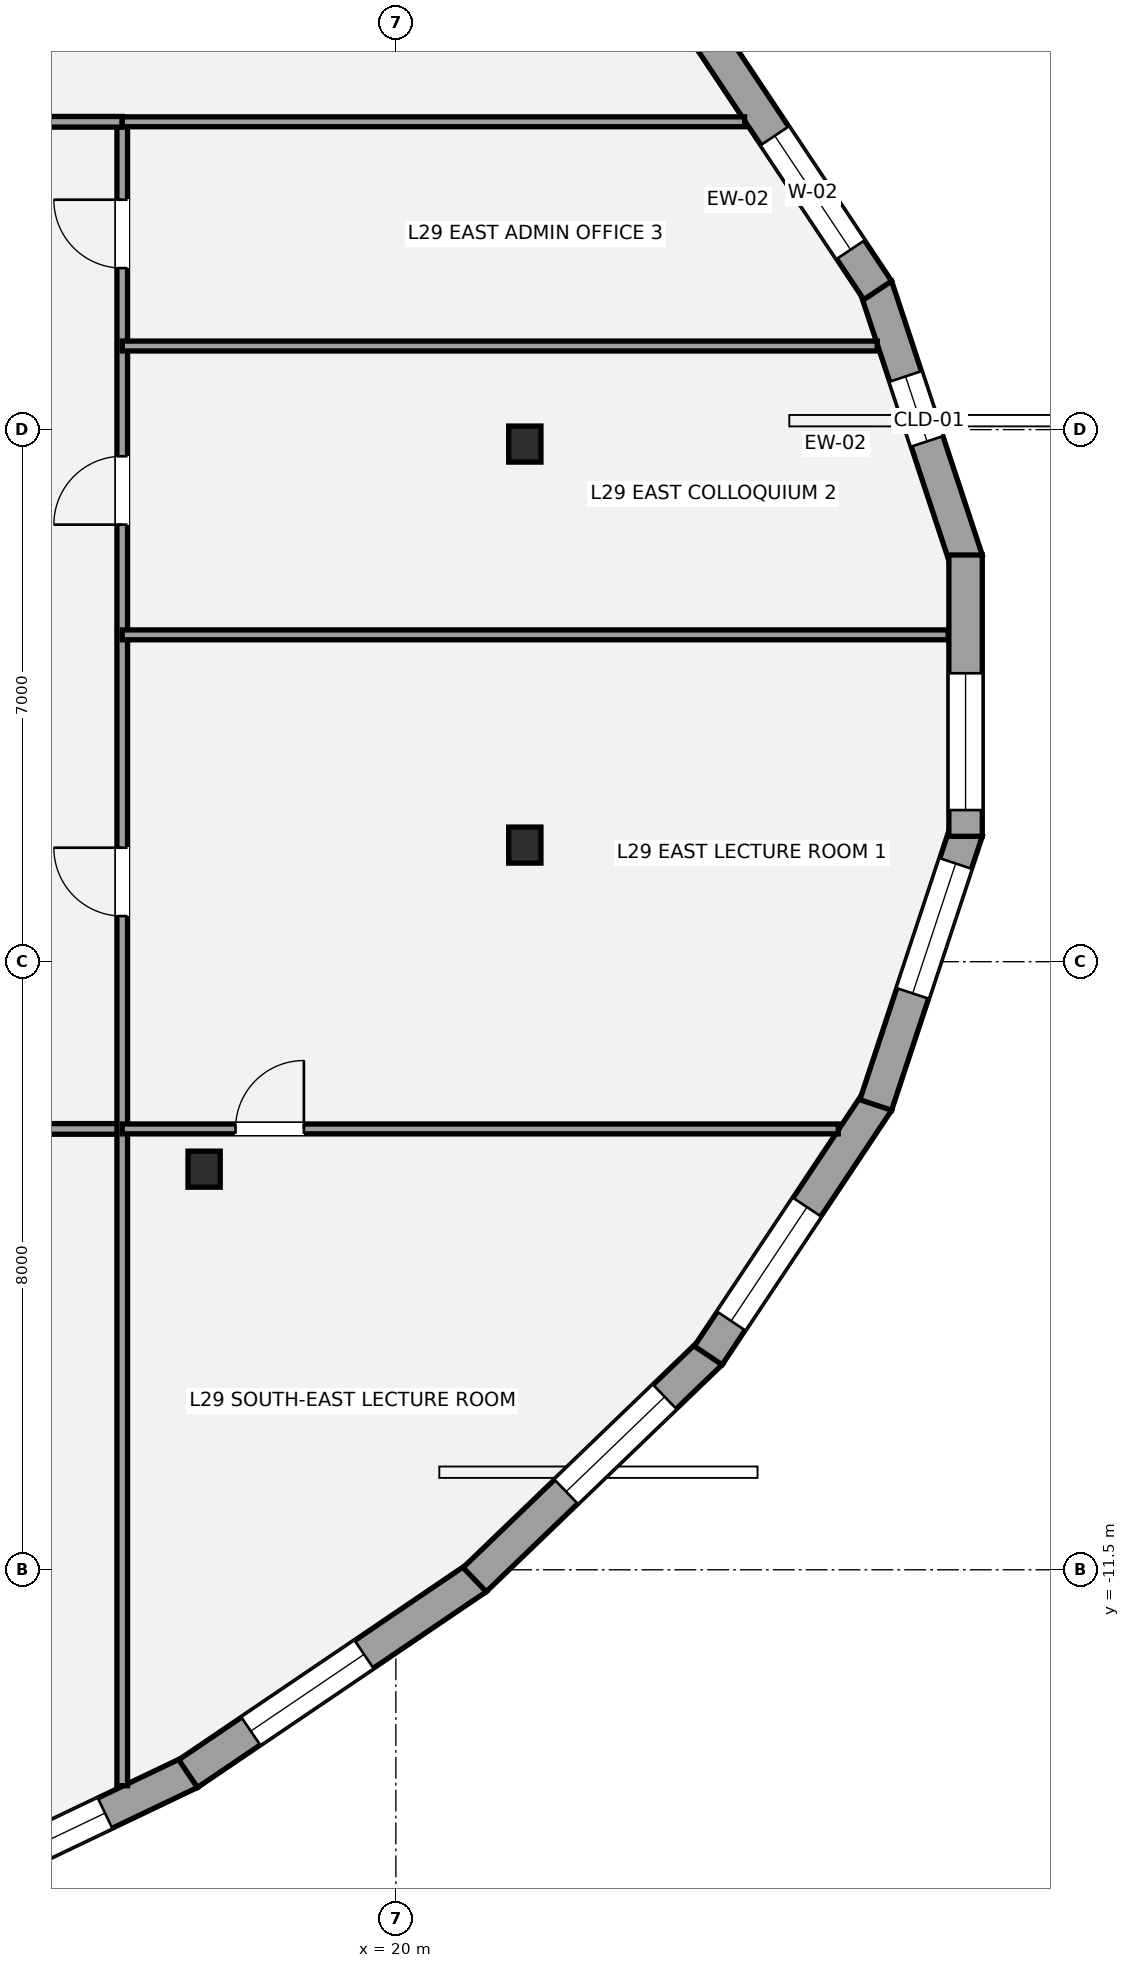
"""IFC4 building model, lengths in metres.
Left out: names, types, materials, properties, quantities, classifications, styles, units other than length and angle.
Written with IfcOpenShell. Run it as: python <this file> out.ifc"""

import sys

from ifc_helpers import new_model, si_unit, direction, frame, frame_2d, origin, origin_2d, place, context, subcontext, project, spatial, rectangle, i_section, extrude, element, fill, save


model = new_model("IFC4")
c1 = context("Model", 3, precision=1e-05, world=origin(), true_north=direction((0.0, 1.0)))
c2 = subcontext(c1, "Body", "Model", "MODEL_VIEW")
j1 = project(units=[si_unit("LENGTHUNIT", "METRE"), si_unit("PLANEANGLEUNIT", "RADIAN")], contexts=[c1])
p1 = place(None, origin())
s1 = spatial("IfcSite", under=j1, at=p1, CompositionType="ELEMENT")
p2 = place(p1, origin())
s2 = spatial("IfcBuilding", under=s1, at=p2, CompositionType="ELEMENT")
p3 = place(p2, frame((0.0, 0.0, 110.6)))
s3 = spatial("IfcBuildingStorey", under=s2, at=p3, CompositionType="ELEMENT", Elevation=110.6)
for number, where, z_axis, x_axis in (
    (1, (21.697, 3.31, 0.0), (0.0, 0.0, 1.0), (1.0, 0.0, 0.0)),
    (2, (17.477, -6.229, 0.0), (0.0, 0.0, 1.0), (1.0, 0.0, 0.0)),
    (3, (21.697, -1.966, 0.0), (0.0, 0.0, 1.0), (1.0, 0.0, 0.0)),
):
    element("IfcColumn", number, at=place(p3, frame(where, z_axis=z_axis, x_axis=x_axis)), inside=s3, PredefinedType="COLUMN", context=c2, shape_type="SweptSolid", body=[
        extrude(i_section(OverallWidth=0.424, OverallDepth=0.474, WebThickness=0.048, FlangeThickness=0.077, at=origin_2d()), origin(), (0.0, 0.0, 1.0), 3.5),
    ])
p4 = place(p3, frame((26.314, 5.385, 0.0), z_axis=(0.0, 0.0, 1.0), x_axis=(0.314316911692, -0.94931811266, 0.0)))
e4 = element("IfcWall", 4, at=p4, inside=s3, PredefinedType="STANDARD", context=c2, shape_type="SweptSolid", body=[
    extrude(rectangle(XDim=3.796, YDim=0.44, at=frame_2d((1.898, 0.0))), origin(), (0.0, 0.0, 1.0), 2.532),
])
p5 = place(p4, frame((1.248, 0.0, 0.58)))
e5 = element("IfcOpeningElement", 5, at=p5, cuts=e4, PredefinedType="OPENING", context=c2, shape_type="SweptSolid", body=[
    extrude(rectangle(XDim=0.9, YDim=1.35, at=frame_2d((0.45, 0.675))), frame((0.0, 0.23, 0.0), z_axis=(0.0, -1.0, 0.0), x_axis=(1.0, 0.0, 0.0)), (0.0, 0.0, 1.0), 0.46),
])
p6 = place(p3, frame((24.11, 8.68, 0.0), z_axis=(0.0, 0.0, 1.0), x_axis=(0.554293965046, -0.83232097193, 0.0)))
e6 = element("IfcWall", 6, at=p6, inside=s3, PredefinedType="STANDARD", context=c2, shape_type="SweptSolid", body=[
    extrude(rectangle(XDim=4.023, YDim=0.44, at=frame_2d((2.011, 0.0))), origin(), (0.0, 0.0, 1.0), 2.528),
])
p7 = place(p6, frame((1.579, 0.0, 0.65)))
e7 = element("IfcOpeningElement", 7, at=p7, cuts=e6, PredefinedType="OPENING", context=c2, shape_type="SweptSolid", body=[
    extrude(rectangle(XDim=1.8, YDim=1.7, at=frame_2d((0.9, 0.85))), frame((0.0, 0.23, 0.0), z_axis=(0.0, -1.0, 0.0), x_axis=(1.0, 0.0, 0.0)), (0.0, 0.0, 1.0), 0.46),
])
p8 = place(p3, frame((17.295, -14.166, 0.0), z_axis=(0.0, 0.0, 1.0), x_axis=(-0.902372757907, -0.430956385018, 0.0)))
e8 = element("IfcWall", 8, at=p8, inside=s3, PredefinedType="STANDARD", context=c2, shape_type="SweptSolid", body=[
    extrude(rectangle(XDim=4.882, YDim=0.44, at=frame_2d((2.441, 0.0))), origin(), (0.0, 0.0, 1.0), 2.528),
])
p9 = place(p8, frame((1.243, 0.0, 0.65)))
e9 = element("IfcOpeningElement", 9, at=p9, cuts=e8, PredefinedType="OPENING", context=c2, shape_type="SweptSolid", body=[
    extrude(rectangle(XDim=1.8, YDim=1.7, at=frame_2d((0.9, 0.85))), frame((0.0, 0.23, 0.0), z_axis=(0.0, -1.0, 0.0), x_axis=(1.0, 0.0, 0.0)), (0.0, 0.0, 1.0), 0.46),
])
p10 = place(p3, frame((21.066, -11.606, 0.0), z_axis=(0.0, 0.0, 1.0), x_axis=(-0.827754551165, -0.56109036975, 0.0)))
e10 = element("IfcWall", 10, at=p10, inside=s3, PredefinedType="STANDARD", context=c2, shape_type="SweptSolid", body=[
    extrude(rectangle(XDim=4.591, YDim=0.44, at=frame_2d((2.295, 0.0))), origin(), (0.0, 0.0, 1.0), 2.528),
])
p11 = place(p10, frame((1.794, 0.0, 0.65)))
e11 = element("IfcOpeningElement", 11, at=p11, cuts=e10, PredefinedType="OPENING", context=c2, shape_type="SweptSolid", body=[
    extrude(rectangle(XDim=1.8, YDim=1.7, at=frame_2d((0.9, 0.85))), frame((0.0, 0.23, 0.0), z_axis=(0.0, -1.0, 0.0), x_axis=(1.0, 0.0, 0.0)), (0.0, 0.0, 1.0), 0.46),
])
p12 = place(p3, frame((24.14, -8.644, 0.0), z_axis=(0.0, 0.0, 1.0), x_axis=(-0.720581378362, -0.693370375166, 0.0)))
e12 = element("IfcWall", 12, at=p12, inside=s3, PredefinedType="STANDARD", context=c2, shape_type="SweptSolid", body=[
    extrude(rectangle(XDim=4.307, YDim=0.44, at=frame_2d((2.153, 0.0))), origin(), (0.0, 0.0, 1.0), 2.528),
])
p13 = place(p12, frame((0.837, 0.0, 0.65)))
e13 = element("IfcOpeningElement", 13, at=p13, cuts=e12, PredefinedType="OPENING", context=c2, shape_type="SweptSolid", body=[
    extrude(rectangle(XDim=1.8, YDim=1.7, at=frame_2d((0.9, 0.85))), frame((0.0, 0.23, 0.0), z_axis=(0.0, -1.0, 0.0), x_axis=(1.0, 0.0, 0.0)), (0.0, 0.0, 1.0), 0.46),
])
p14 = place(p3, frame((26.34, -5.332, 0.0), z_axis=(0.0, 0.0, 1.0), x_axis=(-0.554293965046, -0.83232097193, 0.0)))
e14 = element("IfcWall", 14, at=p14, inside=s3, PredefinedType="STANDARD", context=c2, shape_type="SweptSolid", body=[
    extrude(rectangle(XDim=4.023, YDim=0.44, at=frame_2d((2.011, 0.0))), origin(), (0.0, 0.0, 1.0), 2.528),
])
p15 = place(p14, frame((1.678, 0.0, 0.65)))
e15 = element("IfcOpeningElement", 15, at=p15, cuts=e14, PredefinedType="OPENING", context=c2, shape_type="SweptSolid", body=[
    extrude(rectangle(XDim=1.8, YDim=1.7, at=frame_2d((0.9, 0.85))), frame((0.0, 0.23, 0.0), z_axis=(0.0, -1.0, 0.0), x_axis=(1.0, 0.0, 0.0)), (0.0, 0.0, 1.0), 0.46),
])
p16 = place(p3, frame((27.507, -1.781, 0.0), z_axis=(0.0, 0.0, 1.0), x_axis=(-0.314316911692, -0.94931811266, 0.0)))
e16 = element("IfcWall", 16, at=p16, inside=s3, PredefinedType="STANDARD", context=c2, shape_type="SweptSolid", body=[
    extrude(rectangle(XDim=3.796, YDim=0.44, at=frame_2d((1.898, 0.0))), origin(), (0.0, 0.0, 1.0), 2.532),
])
p17 = place(p16, frame((0.449, 0.0, 0.65)))
e17 = element("IfcOpeningElement", 17, at=p17, cuts=e16, PredefinedType="OPENING", context=c2, shape_type="SweptSolid", body=[
    extrude(rectangle(XDim=1.8, YDim=1.7, at=frame_2d((0.9, 0.85))), frame((0.0, 0.23, 0.0), z_axis=(0.0, -1.0, 0.0), x_axis=(1.0, 0.0, 0.0)), (0.0, 0.0, 1.0), 0.46),
])
p18 = place(p3, frame((27.496, 1.851, 0.0), z_axis=(0.0, 0.0, 1.0), x_axis=(0.0, -1.0, 0.0)))
e18 = element("IfcWall", 18, at=p18, inside=s3, PredefinedType="STANDARD", context=c2, shape_type="SweptSolid", body=[
    extrude(rectangle(XDim=3.701, YDim=0.44, at=frame_2d((1.851, 0.0))), origin(), (0.0, 0.0, 1.0), 2.532),
])
p19 = place(p18, frame((1.556, 0.0, 0.65)))
e19 = element("IfcOpeningElement", 19, at=p19, cuts=e18, PredefinedType="OPENING", context=c2, shape_type="SweptSolid", body=[
    extrude(rectangle(XDim=1.8, YDim=1.7, at=frame_2d((0.9, 0.85))), frame((0.0, 0.23, 0.0), z_axis=(0.0, -1.0, 0.0), x_axis=(1.0, 0.0, 0.0)), (0.0, 0.0, 1.0), 0.46),
])
p20 = place(p3, frame((-17.8, -5.7, 0.0), z_axis=(0.0, 0.0, 1.0), x_axis=(1.0, 0.0, 0.0)))
e20 = element("IfcWall", 20, at=p20, inside=s3, PredefinedType="PARTITIONING", context=c2, shape_type="SweptSolid", body=[
    extrude(rectangle(XDim=34.2, YDim=0.14, at=frame_2d((17.1, 0.0))), origin(), (0.0, 0.0, 1.0), 2.688),
])
p21 = place(p20, frame((3.4, 0.0, 0.0)))
e21 = element("IfcOpeningElement", 21, at=p21, cuts=e20, PredefinedType="OPENING", context=c2, shape_type="SweptSolid", body=[
    extrude(rectangle(XDim=1.5, YDim=2.15, at=frame_2d((0.75, 1.075))), frame((0.0, 0.08, 0.0), z_axis=(0.0, -1.0, 0.0), x_axis=(1.0, 0.0, 0.0)), (0.0, 0.0, 1.0), 0.16),
])
p22 = place(p20, frame((11.55, 0.0, 0.0)))
e22 = element("IfcOpeningElement", 22, at=p22, cuts=e20, PredefinedType="OPENING", context=c2, shape_type="SweptSolid", body=[
    extrude(rectangle(XDim=1.5, YDim=2.15, at=frame_2d((0.75, 1.075))), frame((0.0, 0.08, 0.0), z_axis=(0.0, -1.0, 0.0), x_axis=(1.0, 0.0, 0.0)), (0.0, 0.0, 1.0), 0.16),
])
p23 = place(p20, frame((19.55, 0.0, 0.0)))
e23 = element("IfcOpeningElement", 23, at=p23, cuts=e20, PredefinedType="OPENING", context=c2, shape_type="SweptSolid", body=[
    extrude(rectangle(XDim=1.5, YDim=2.15, at=frame_2d((0.75, 1.075))), frame((0.0, 0.08, 0.0), z_axis=(0.0, -1.0, 0.0), x_axis=(1.0, 0.0, 0.0)), (0.0, 0.0, 1.0), 0.16),
])
p24 = place(p20, frame((28.5, 0.0, 0.0)))
e24 = element("IfcOpeningElement", 24, at=p24, cuts=e20, PredefinedType="OPENING", context=c2, shape_type="SweptSolid", body=[
    extrude(rectangle(XDim=1.5, YDim=2.15, at=frame_2d((0.75, 1.075))), frame((0.0, 0.08, 0.0), z_axis=(0.0, -1.0, 0.0), x_axis=(1.0, 0.0, 0.0)), (0.0, 0.0, 1.0), 0.16),
])
p25 = place(p3, frame((16.4, -14.341, 0.0), z_axis=(0.0, 0.0, 1.0), x_axis=(0.0, 1.0, 0.0)))
e25 = element("IfcWall", 25, at=p25, inside=s3, PredefinedType="PARTITIONING", context=c2, shape_type="SweptSolid", body=[
    extrude(rectangle(XDim=21.891, YDim=0.14, at=frame_2d((10.945, 0.0))), origin(), (0.0, 0.0, 1.0), 2.763),
])
p26 = place(p25, frame((11.44, 0.0, 0.0)))
e26 = element("IfcOpeningElement", 26, at=p26, cuts=e25, PredefinedType="OPENING", context=c2, shape_type="SweptSolid", body=[
    extrude(rectangle(XDim=0.9, YDim=2.1, at=frame_2d((0.45, 1.05))), frame((0.0, 0.08, 0.0), z_axis=(0.0, -1.0, 0.0), x_axis=(1.0, 0.0, 0.0)), (0.0, 0.0, 1.0), 0.16),
])
p27 = place(p25, frame((16.59, 0.0, 0.0)))
e27 = element("IfcOpeningElement", 27, at=p27, cuts=e25, PredefinedType="OPENING", context=c2, shape_type="SweptSolid", body=[
    extrude(rectangle(XDim=0.9, YDim=2.1, at=frame_2d((0.45, 1.05))), frame((0.0, 0.08, 0.0), z_axis=(0.0, -1.0, 0.0), x_axis=(1.0, 0.0, 0.0)), (0.0, 0.0, 1.0), 0.16),
])
p28 = place(p25, frame((19.965, 0.0, 0.0)))
e28 = element("IfcOpeningElement", 28, at=p28, cuts=e25, PredefinedType="OPENING", context=c2, shape_type="SweptSolid", body=[
    extrude(rectangle(XDim=0.9, YDim=2.1, at=frame_2d((0.45, 1.05))), frame((0.0, 0.08, 0.0), z_axis=(0.0, -1.0, 0.0), x_axis=(1.0, 0.0, 0.0)), (0.0, 0.0, 1.0), 0.16),
])
p29 = place(p3, frame((13.9, 7.55, 0.0), z_axis=(0.0, 0.0, 1.0), x_axis=(1.0, 0.0, 0.0)))
e29 = element("IfcWall", 29, at=p29, inside=s3, PredefinedType="PARTITIONING", context=c2, shape_type="SweptSolid", body=[
    extrude(rectangle(XDim=2.5, YDim=0.14, at=frame_2d((1.25, 0.0))), origin(), (0.0, 0.0, 1.0), 2.763),
])
p30 = place(p29, frame((0.32, 0.0, 0.0)))
e30 = element("IfcOpeningElement", 30, at=p30, cuts=e29, PredefinedType="OPENING", context=c2, shape_type="SweptSolid", body=[
    extrude(rectangle(XDim=0.92, YDim=2.15, at=frame_2d((0.46, 1.075))), frame((0.0, 0.08, 0.0), z_axis=(0.0, -1.0, 0.0), x_axis=(1.0, 0.0, 0.0)), (0.0, 0.0, 1.0), 0.16),
])
p31 = place(p3, frame((16.4, 7.55, 0.0), z_axis=(0.0, 0.0, 1.0), x_axis=(1.0, 0.0, 0.0)))
e31 = element("IfcWall", 31, at=p31, inside=s3, PredefinedType="PARTITIONING", context=c2, shape_type="SweptSolid", body=[
    extrude(rectangle(XDim=8.189, YDim=0.13, at=frame_2d((4.094, 0.0))), origin(), (0.0, 0.0, 1.0), 2.763),
])
p32 = place(p3, frame((16.4, -5.7, 0.0), z_axis=(0.0, 0.0, 1.0), x_axis=(1.0, 0.0, 0.0)))
e32 = element("IfcWall", 32, at=p32, inside=s3, PredefinedType="PARTITIONING", context=c2, shape_type="SweptSolid", body=[
    extrude(rectangle(XDim=9.421, YDim=0.13, at=frame_2d((4.71, 0.0))), origin(), (0.0, 0.0, 1.0), 2.688),
])
p33 = place(p32, frame((1.49, 0.0, 0.0)))
e33 = element("IfcOpeningElement", 33, at=p33, cuts=e32, PredefinedType="OPENING", context=c2, shape_type="SweptSolid", body=[
    extrude(rectangle(XDim=0.9, YDim=2.1, at=frame_2d((0.45, 1.05))), frame((0.0, 0.075, 0.0), z_axis=(0.0, -1.0, 0.0), x_axis=(1.0, 0.0, 0.0)), (0.0, 0.0, 1.0), 0.15),
])
p34 = place(p3, frame((16.4, 0.8, 0.0), z_axis=(0.0, 0.0, 1.0), x_axis=(1.0, 0.0, 0.0)))
e34 = element("IfcWall", 34, at=p34, inside=s3, PredefinedType="PARTITIONING", context=c2, shape_type="SweptSolid", body=[
    extrude(rectangle(XDim=10.868, YDim=0.13, at=frame_2d((5.434, 0.0))), origin(), (0.0, 0.0, 1.0), 2.763),
])
p35 = place(p3, frame((16.4, 4.6, 0.0), z_axis=(0.0, 0.0, 1.0), x_axis=(1.0, 0.0, 0.0)))
e35 = element("IfcWall", 35, at=p35, inside=s3, PredefinedType="PARTITIONING", context=c2, shape_type="SweptSolid", body=[
    extrude(rectangle(XDim=9.934, YDim=0.13, at=frame_2d((4.967, 0.0))), origin(), (0.0, 0.0, 1.0), 2.763),
])
p36 = place(p5, origin())
e36 = element("IfcWindow", 36, at=p36, inside=s3, PartitioningType="SINGLE_PANEL", PredefinedType="WINDOW", context=c2, shape_type="SweptSolid", body=[
    extrude(rectangle(XDim=0.9, YDim=1.35, at=frame_2d((0.45, 0.675))), frame((0.0, -0.01, 0.0), z_axis=(0.0, -1.0, 0.0), x_axis=(1.0, 0.0, 0.0)), (0.0, 0.0, 1.0), 0.06),
])
fill(e5, e36)
p37 = place(p7, origin())
e37 = element("IfcWindow", 37, at=p37, inside=s3, PartitioningType="SINGLE_PANEL", PredefinedType="WINDOW", context=c2, shape_type="SweptSolid", body=[
    extrude(rectangle(XDim=1.8, YDim=1.7, at=frame_2d((0.9, 0.85))), frame((0.0, -0.01, 0.0), z_axis=(0.0, -1.0, 0.0), x_axis=(1.0, 0.0, 0.0)), (0.0, 0.0, 1.0), 0.06),
])
fill(e7, e37)
p38 = place(p9, origin())
e38 = element("IfcWindow", 38, at=p38, inside=s3, PartitioningType="SINGLE_PANEL", PredefinedType="WINDOW", context=c2, shape_type="SweptSolid", body=[
    extrude(rectangle(XDim=1.8, YDim=1.7, at=frame_2d((0.9, 0.85))), frame((0.0, -0.01, 0.0), z_axis=(0.0, -1.0, 0.0), x_axis=(1.0, 0.0, 0.0)), (0.0, 0.0, 1.0), 0.06),
])
fill(e9, e38)
p39 = place(p11, origin())
e39 = element("IfcWindow", 39, at=p39, inside=s3, PartitioningType="SINGLE_PANEL", PredefinedType="WINDOW", context=c2, shape_type="SweptSolid", body=[
    extrude(rectangle(XDim=1.8, YDim=1.7, at=frame_2d((0.9, 0.85))), frame((0.0, -0.01, 0.0), z_axis=(0.0, -1.0, 0.0), x_axis=(1.0, 0.0, 0.0)), (0.0, 0.0, 1.0), 0.06),
])
fill(e11, e39)
p40 = place(p13, origin())
e40 = element("IfcWindow", 40, at=p40, inside=s3, PartitioningType="SINGLE_PANEL", PredefinedType="WINDOW", context=c2, shape_type="SweptSolid", body=[
    extrude(rectangle(XDim=1.8, YDim=1.7, at=frame_2d((0.9, 0.85))), frame((0.0, -0.01, 0.0), z_axis=(0.0, -1.0, 0.0), x_axis=(1.0, 0.0, 0.0)), (0.0, 0.0, 1.0), 0.06),
])
fill(e13, e40)
p41 = place(p15, origin())
e41 = element("IfcWindow", 41, at=p41, inside=s3, PartitioningType="SINGLE_PANEL", PredefinedType="WINDOW", context=c2, shape_type="SweptSolid", body=[
    extrude(rectangle(XDim=1.8, YDim=1.7, at=frame_2d((0.9, 0.85))), frame((0.0, -0.01, 0.0), z_axis=(0.0, -1.0, 0.0), x_axis=(1.0, 0.0, 0.0)), (0.0, 0.0, 1.0), 0.06),
])
fill(e15, e41)
p42 = place(p17, origin())
e42 = element("IfcWindow", 42, at=p42, inside=s3, PartitioningType="SINGLE_PANEL", PredefinedType="WINDOW", context=c2, shape_type="SweptSolid", body=[
    extrude(rectangle(XDim=1.8, YDim=1.7, at=frame_2d((0.9, 0.85))), frame((0.0, -0.01, 0.0), z_axis=(0.0, -1.0, 0.0), x_axis=(1.0, 0.0, 0.0)), (0.0, 0.0, 1.0), 0.06),
])
fill(e17, e42)
p43 = place(p19, origin())
e43 = element("IfcWindow", 43, at=p43, inside=s3, PartitioningType="SINGLE_PANEL", PredefinedType="WINDOW", context=c2, shape_type="SweptSolid", body=[
    extrude(rectangle(XDim=1.8, YDim=1.7, at=frame_2d((0.9, 0.85))), frame((0.0, -0.01, 0.0), z_axis=(0.0, -1.0, 0.0), x_axis=(1.0, 0.0, 0.0)), (0.0, 0.0, 1.0), 0.06),
])
fill(e19, e43)
p44 = place(p33, origin())
e44 = element("IfcDoor", 44, at=p44, inside=s3, OperationType="SINGLE_SWING_RIGHT", PredefinedType="DOOR", context=c2, shape_type="SweptSolid", body=[
    extrude(rectangle(XDim=0.9, YDim=2.1, at=frame_2d((0.45, 1.05))), frame((0.0, 0.025, 0.0), z_axis=(0.0, -1.0, 0.0), x_axis=(1.0, 0.0, 0.0)), (0.0, 0.0, 1.0), 0.05),
])
fill(e33, e44)
p45 = place(p26, origin())
e45 = element("IfcDoor", 45, at=p45, inside=s3, OperationType="SINGLE_SWING_RIGHT", PredefinedType="DOOR", context=c2, shape_type="SweptSolid", body=[
    extrude(rectangle(XDim=0.9, YDim=2.1, at=frame_2d((0.45, 1.05))), frame((0.0, 0.025, 0.0), z_axis=(0.0, -1.0, 0.0), x_axis=(1.0, 0.0, 0.0)), (0.0, 0.0, 1.0), 0.05),
])
fill(e26, e45)
p46 = place(p27, origin())
e46 = element("IfcDoor", 46, at=p46, inside=s3, OperationType="SINGLE_SWING_LEFT", PredefinedType="DOOR", context=c2, shape_type="SweptSolid", body=[
    extrude(rectangle(XDim=0.9, YDim=2.1, at=frame_2d((0.45, 1.05))), frame((0.0, 0.025, 0.0), z_axis=(0.0, -1.0, 0.0), x_axis=(1.0, 0.0, 0.0)), (0.0, 0.0, 1.0), 0.05),
])
fill(e27, e46)
p47 = place(p28, origin())
e47 = element("IfcDoor", 47, at=p47, inside=s3, OperationType="SINGLE_SWING_RIGHT", PredefinedType="DOOR", context=c2, shape_type="SweptSolid", body=[
    extrude(rectangle(XDim=0.9, YDim=2.1, at=frame_2d((0.45, 1.05))), frame((0.0, 0.025, 0.0), z_axis=(0.0, -1.0, 0.0), x_axis=(1.0, 0.0, 0.0)), (0.0, 0.0, 1.0), 0.05),
])
fill(e28, e47)
save(model, sys.argv[1])
